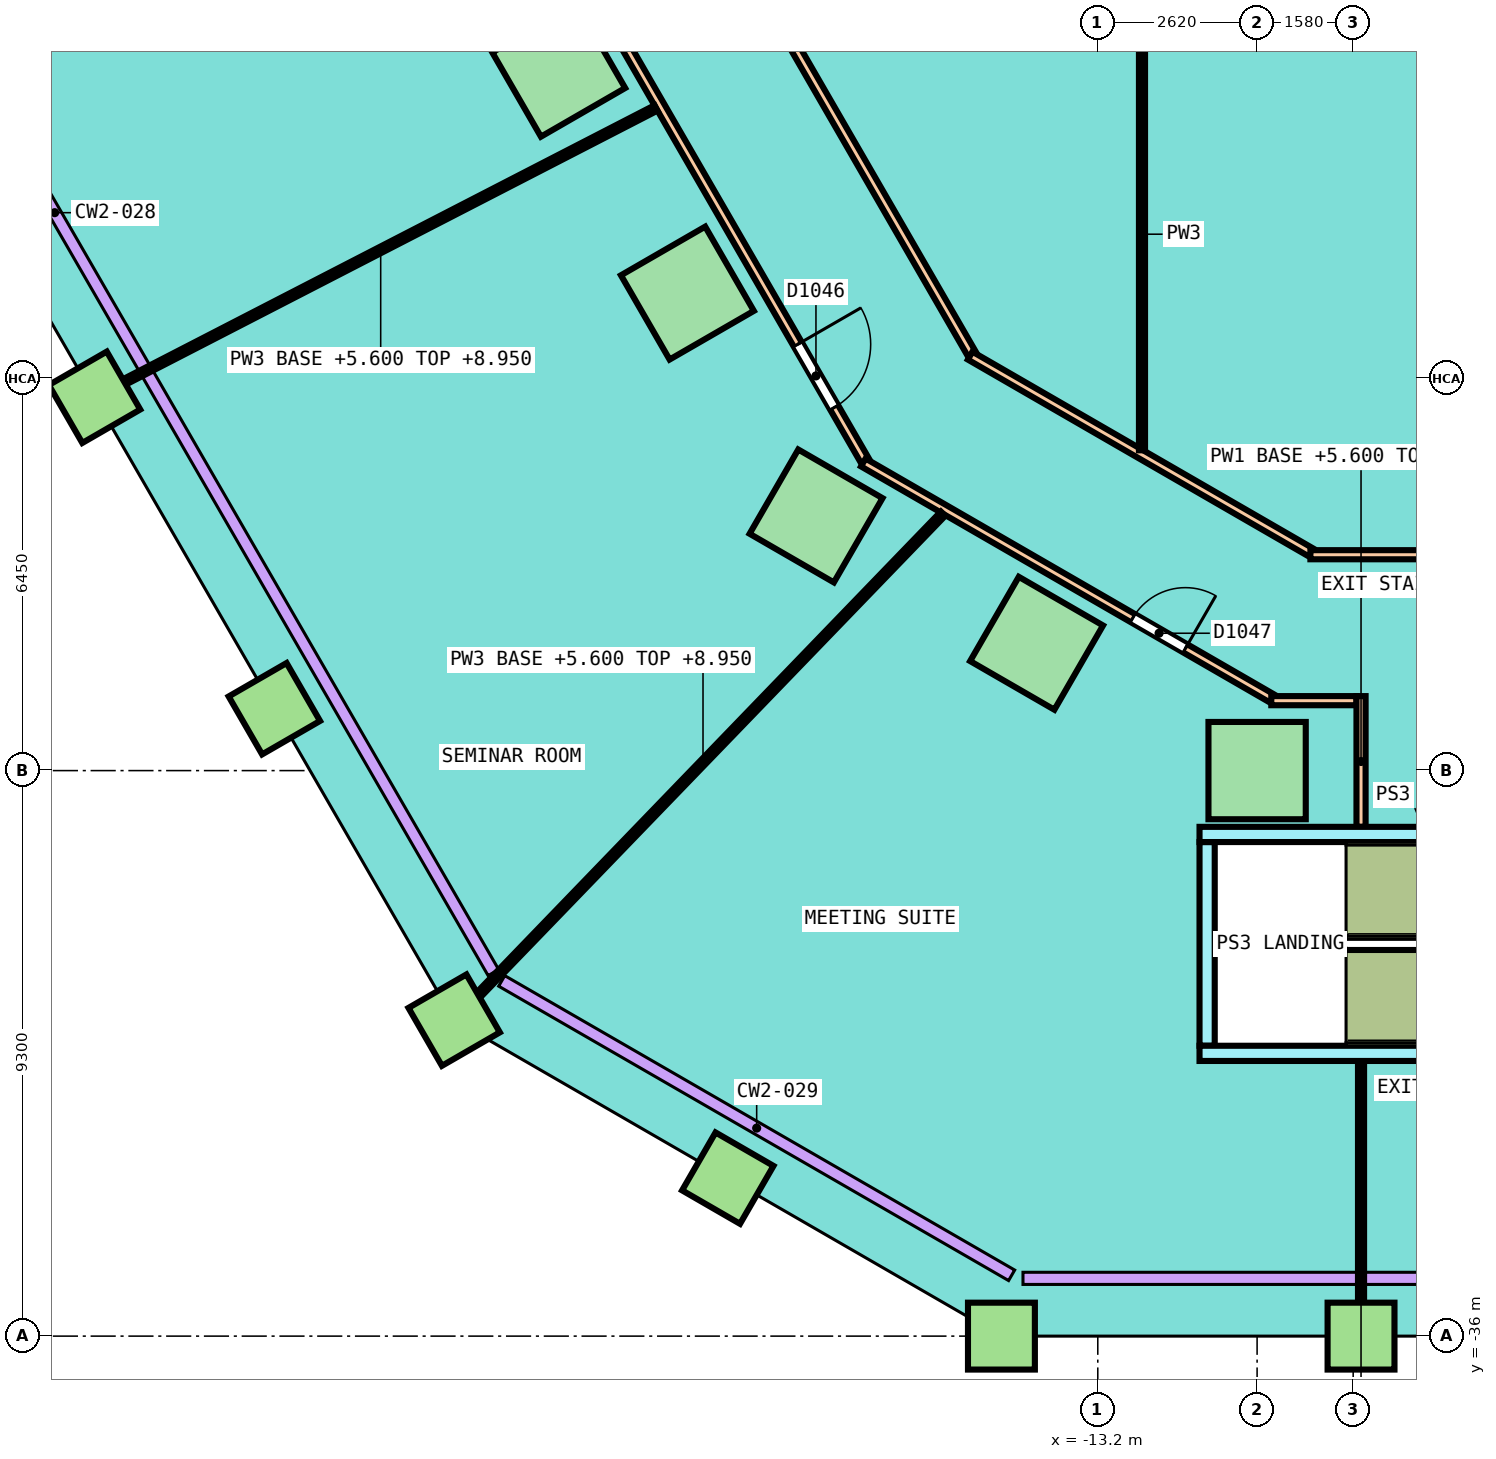
"""IFC4 building model, lengths in metres.
Left out: names, types, materials, properties, quantities, classifications, styles, units other than length and angle.
Written with IfcOpenShell. Run it as: python <this file> out.ifc"""

import sys

from ifc_helpers import new_model, si_unit, direction, frame, frame_2d, origin, origin_2d, place, context, subcontext, project, spatial, rectangle, extrude, element, fill, save


model = new_model("IFC4")
c1 = context("Model", 3, precision=1e-05, world=origin(), true_north=direction((0.0, 1.0)))
c2 = subcontext(c1, "Body", "Model", "MODEL_VIEW")
j1 = project(units=[si_unit("LENGTHUNIT", "METRE"), si_unit("PLANEANGLEUNIT", "RADIAN")], contexts=[c1])
p1 = place(None, origin())
s1 = spatial("IfcSite", under=j1, at=p1, CompositionType="ELEMENT")
p2 = place(p1, origin())
s2 = spatial("IfcBuilding", under=s1, at=p2, CompositionType="ELEMENT")
p3 = place(p2, frame((0.0, 0.0, 5.6)))
s3 = spatial("IfcBuildingStorey", under=s2, at=p3, CompositionType="ELEMENT", Elevation=5.6)
for number, where, z_axis, x_axis in (
    (1, (-22.065, -15.183, 0.0), (0.0, 0.0, 1.0), (0.5, -0.866, 0.0)),
    (2, (-19.949, -18.847, 0.0), (0.0, 0.0, 1.0), (0.5, -0.866, 0.0)),
    (3, (-17.833, -22.512, 0.0), (0.0, 0.0, 1.0), (0.866, -0.5, 0.0)),
    (4, (-14.206, -24.606, 0.0), (0.0, 0.0, 1.0), (0.866, -0.5, 0.0)),
    (5, (-10.58, -26.7, 0.0), (0.0, 0.0, 1.0), (1.0, 0.0, 0.0)),
):
    element("IfcColumn", number, at=place(p3, frame(where, z_axis=z_axis, x_axis=x_axis)), inside=s3, PredefinedType="COLUMN", context=c2, shape_type="SweptSolid", body=[
        extrude(rectangle(XDim=1.6, YDim=1.6, at=origin_2d()), origin(), (0.0, 0.0, 1.0), 4.25),
    ])
for number, where, z_axis, x_axis in (
    (6, (-29.698, -20.561, 0.0), (0.0, 0.0, 1.0), (0.5, -0.866, 0.0)),
    (7, (-26.741, -25.682, 0.0), (0.0, 0.0, 1.0), (0.5, -0.866, 0.0)),
    (8, (-23.785, -30.804, 0.0), (0.0, 0.0, 1.0), (0.5, -0.866, 0.0)),
    (9, (-19.285, -33.402, 0.0), (0.0, 0.0, 1.0), (0.866, -0.5, 0.0)),
    (10, (-14.785, -36.0, 0.0), (0.0, 0.0, 1.0), (1.0, 0.0, 0.0)),
    (11, (-8.871, -36.0, 0.0), (0.0, 0.0, 1.0), (1.0, 0.0, 0.0)),
):
    element("IfcColumn", number, at=place(p3, frame(where, z_axis=z_axis, x_axis=x_axis)), inside=s3, PredefinedType="COLUMN", context=c2, shape_type="SweptSolid", body=[
        extrude(rectangle(XDim=1.1, YDim=1.1, at=origin_2d()), origin(), (0.0, 0.0, 1.0), 4.25),
    ])
p4 = place(p3, frame((-22.753, -6.89, 0.0), z_axis=(0.0, 0.0, 1.0), x_axis=(0.499997859304, -0.866026639712, 0.0)))
e12 = element("IfcWall", 12, at=p4, inside=s3, PredefinedType="PARTITIONING", context=c2, shape_type="SweptSolid", body=[
    extrude(rectangle(XDim=14.963, YDim=0.15, at=frame_2d((7.482, 0.0))), origin(), (0.0, 0.0, 1.0), 3.2),
])
p5 = place(p4, frame((3.903, 0.0, 0.0)))
e13 = element("IfcOpeningElement", 13, at=p5, cuts=e12, PredefinedType="OPENING", context=c2, shape_type="SweptSolid", body=[
    extrude(rectangle(XDim=1.2, YDim=2.1, at=frame_2d((0.6, 1.05))), frame((0.0, 0.085, 0.0), z_axis=(0.0, -1.0, 0.0), x_axis=(1.0, 0.0, 0.0)), (0.0, 0.0, 1.0), 0.17),
])
p6 = place(p3, frame((-27.3, -3.814, 0.0), z_axis=(0.0, 0.0, 1.0), x_axis=(0.499997805905, -0.866026670542, 0.0)))
e14 = element("IfcWall", 14, at=p6, inside=s3, PredefinedType="PARTITIONING", context=c2, shape_type="SweptSolid", body=[
    extrude(rectangle(XDim=20.543, YDim=0.15, at=frame_2d((10.272, 0.0))), origin(), (0.0, 0.0, 1.0), 3.2),
])
p7 = place(p6, frame((9.647, 0.0, 0.0)))
e15 = element("IfcOpeningElement", 15, at=p7, cuts=e14, PredefinedType="OPENING", context=c2, shape_type="SweptSolid", body=[
    extrude(rectangle(XDim=1.2, YDim=2.1, at=frame_2d((0.6, 1.05))), frame((0.0, 0.085, 0.0), z_axis=(0.0, -1.0, 0.0), x_axis=(1.0, 0.0, 0.0)), (0.0, 0.0, 1.0), 0.17),
])
p8 = place(p6, frame((18.331, 0.0, 0.0)))
e16 = element("IfcOpeningElement", 16, at=p8, cuts=e14, PredefinedType="OPENING", context=c2, shape_type="SweptSolid", body=[
    extrude(rectangle(XDim=1.2, YDim=2.1, at=frame_2d((0.6, 1.05))), frame((0.0, 0.085, 0.0), z_axis=(0.0, -1.0, 0.0), x_axis=(1.0, 0.0, 0.0)), (0.0, 0.0, 1.0), 0.17),
])
p9 = place(p3, frame((-15.299, -19.876, 0.0), z_axis=(0.0, 0.0, 1.0), x_axis=(0.866024786089, -0.500001069878, 0.0)))
e17 = element("IfcWall", 17, at=p9, inside=s3, PredefinedType="PARTITIONING", context=c2, shape_type="SweptSolid", body=[
    extrude(rectangle(XDim=6.473, YDim=0.15, at=frame_2d((3.236, 0.0))), origin(), (0.0, 0.0, 1.0), 3.2),
])
p10 = place(p3, frame((-17.056, -21.633, 0.0), z_axis=(0.0, 0.0, 1.0), x_axis=(0.866023143435, -0.50000391502, 0.0)))
e18 = element("IfcWall", 18, at=p10, inside=s3, PredefinedType="PARTITIONING", context=c2, shape_type="SweptSolid", body=[
    extrude(rectangle(XDim=7.759, YDim=0.15, at=frame_2d((3.879, 0.0))), origin(), (0.0, 0.0, 1.0), 3.2),
])
p11 = place(p10, frame((5.116, 0.0, 0.0)))
e19 = element("IfcOpeningElement", 19, at=p11, cuts=e18, PredefinedType="OPENING", context=c2, shape_type="SweptSolid", body=[
    extrude(rectangle(XDim=1.0, YDim=2.1, at=frame_2d((0.5, 1.05))), frame((0.0, 0.085, 0.0), z_axis=(0.0, -1.0, 0.0), x_axis=(1.0, 0.0, 0.0)), (0.0, 0.0, 1.0), 0.17),
])
p12 = place(p3, frame((-10.347, -25.55, 0.0), z_axis=(0.0, 0.0, 1.0), x_axis=(1.0, 0.0, 0.0)))
e20 = element("IfcWall", 20, at=p12, inside=s3, PredefinedType="PARTITIONING", context=c2, shape_type="SweptSolid", body=[
    extrude(rectangle(XDim=1.401, YDim=0.15, at=frame_2d((0.7, 0.0))), origin(), (0.0, 0.0, 1.0), 3.2),
])
p13 = place(p3, frame((-8.871, -27.625, 0.0), z_axis=(0.0, 0.0, 1.0), x_axis=(0.0, 1.0, 0.0)))
e21 = element("IfcWall", 21, at=p13, inside=s3, PredefinedType="PARTITIONING", context=c2, shape_type="SweptSolid", body=[
    extrude(rectangle(XDim=2.15, YDim=0.15, at=frame_2d((1.075, 0.0))), origin(), (0.0, 0.0, 1.0), 3.35),
])
p14 = place(p3, frame((-9.704, -23.15, 0.0), z_axis=(0.0, 0.0, 1.0), x_axis=(1.0, 0.0, 0.0)))
e22 = element("IfcWall", 22, at=p14, inside=s3, PredefinedType="PARTITIONING", context=c2, shape_type="SweptSolid", body=[
    extrude(rectangle(XDim=16.429, YDim=0.15, at=frame_2d((8.214, 0.0))), origin(), (0.0, 0.0, 1.0), 3.2),
])
p15 = place(p3, frame((-29.521, -20.469, 0.0), z_axis=(0.0, 0.0, 1.0), x_axis=(0.888930498325, 0.458042104122, 0.0)))
e23 = element("IfcWall", 23, at=p15, inside=s3, PredefinedType="PARTITIONING", context=c2, shape_type="SweptSolid", body=[
    extrude(rectangle(XDim=10.187, YDim=0.1, at=frame_2d((5.093, 0.0))), origin(), (0.0, 0.0, 1.0), 3.35),
])
p16 = place(p3, frame((-12.473, -21.433, 0.0), z_axis=(0.0, 0.0, 1.0), x_axis=(0.0, 1.0, 0.0)))
e24 = element("IfcWall", 24, at=p16, inside=s3, PredefinedType="PARTITIONING", context=c2, shape_type="SweptSolid", body=[
    extrude(rectangle(XDim=7.108, YDim=0.1, at=frame_2d((3.554, 0.0))), origin(), (0.0, 0.0, 1.0), 3.2),
])
p17 = place(p3, frame((-23.64, -30.654, 0.0), z_axis=(0.0, 0.0, 1.0), x_axis=(0.694530893364, 0.719462881713, 0.0)))
e25 = element("IfcWall", 25, at=p17, inside=s3, PredefinedType="PARTITIONING", context=c2, shape_type="SweptSolid", body=[
    extrude(rectangle(XDim=11.369, YDim=0.1, at=frame_2d((5.685, 0.0))), origin(), (0.0, 0.0, 1.0), 3.35),
])
p18 = place(p3, frame((-8.871, -35.8, 0.0), z_axis=(0.0, 0.0, 1.0), x_axis=(0.0, 1.0, 0.0)))
e26 = element("IfcWall", 26, at=p18, inside=s3, PredefinedType="PARTITIONING", context=c2, shape_type="SweptSolid", body=[
    extrude(rectangle(XDim=4.325, YDim=0.1, at=frame_2d((2.163, 0.0))), origin(), (0.0, 0.0, 1.0), 4.25),
])
p19 = place(p3, frame((-11.402, -31.225, 0.0), z_axis=(0.0, 0.0, 1.0), x_axis=(0.0, 1.0, 0.0)))
e27 = element("IfcWall", 27, at=p19, inside=s3, PredefinedType="SOLIDWALL", context=c2, shape_type="SweptSolid", body=[
    extrude(rectangle(XDim=3.35, YDim=0.25, at=frame_2d((1.675, 0.0))), origin(), (0.0, 0.0, 1.0), 4.25),
])
p20 = place(p3, frame((-11.527, -27.75, 0.0), z_axis=(0.0, 0.0, 1.0), x_axis=(1.0, 0.0, 0.0)))
e28 = element("IfcWall", 28, at=p20, inside=s3, PredefinedType="SOLIDWALL", context=c2, shape_type="SweptSolid", body=[
    extrude(rectangle(XDim=8.495, YDim=0.25, at=frame_2d((4.248, 0.0))), origin(), (0.0, 0.0, 1.0), 4.25),
])
p21 = place(p20, frame((7.895, 0.0, 0.0), z_axis=(0.0, 0.0, 1.0), x_axis=(-1.0, 0.0, 0.0)))
e29 = element("IfcOpeningElement", 29, at=p21, cuts=e28, PredefinedType="OPENING", context=c2, shape_type="SweptSolid", body=[
    extrude(rectangle(XDim=1.2, YDim=2.1, at=frame_2d((0.6, 1.05))), frame((0.0, 0.135, 0.0), z_axis=(0.0, -1.0, 0.0), x_axis=(1.0, 0.0, 0.0)), (0.0, 0.0, 1.0), 0.27),
])
p22 = place(p3, frame((-11.527, -31.35, 0.0), z_axis=(0.0, 0.0, 1.0), x_axis=(1.0, 0.0, 0.0)))
e30 = element("IfcWall", 30, at=p22, inside=s3, PredefinedType="SOLIDWALL", context=c2, shape_type="SweptSolid", body=[
    extrude(rectangle(XDim=8.52, YDim=0.25, at=frame_2d((4.26, 0.0))), origin(), (0.0, 0.0, 1.0), 4.25),
])
p23 = place(p3, frame((-24.277, -29.951, 0.0), z_axis=(0.0, 0.0, 1.0), x_axis=(-0.866031096941, -0.499990139034, 0.0)))
e31 = element("IfcWall", 31, at=p23, inside=s3, PredefinedType="SOLIDWALL", context=c2, shape_type="SweptSolid", body=[
    extrude(rectangle(XDim=3.0, YDim=0.4, at=frame_2d((1.5, 0.0))), origin(), (0.0, 0.0, 1.0), 4.6),
])
for number, where, z_axis, x_axis in (
    (32, (-31.15, -18.446, 0.0), (0.0, 0.0, 1.0), (0.5, -0.866, 0.0)),
    (33, (-33.402, -19.746, 0.0), (0.0, 0.0, 1.0), (0.5, -0.866, 0.0)),
):
    element("IfcWall", number, at=place(p3, frame(where, z_axis=z_axis, x_axis=x_axis)), inside=s3, PredefinedType="SOLIDWALL", context=c2, shape_type="SweptSolid", body=[
        extrude(rectangle(XDim=13.2, YDim=0.4, at=frame_2d((6.6, 0.0))), origin(), (0.0, 0.0, 1.0), 4.6),
    ])
p24 = place(p3, frame((-30.252, -33.401, 0.0), z_axis=(0.0, 0.0, 1.0), x_axis=(-0.866022959057, -0.500004234368, 0.0)))
e34 = element("IfcWall", 34, at=p24, inside=s3, PredefinedType="SOLIDWALL", context=c2, shape_type="SweptSolid", body=[
    extrude(rectangle(XDim=2.5, YDim=0.4, at=frame_2d((1.25, 0.0))), origin(), (0.0, 0.0, 1.0), 4.6),
])
p25 = place(p3, frame((-37.126, -21.896, 0.0), z_axis=(0.0, 0.0, 1.0), x_axis=(0.500010103361, -0.866019570528, 0.0)))
e35 = element("IfcWall", 35, at=p25, inside=s3, PredefinedType="SOLIDWALL", context=c2, shape_type="SweptSolid", body=[
    extrude(rectangle(XDim=13.2, YDim=0.4, at=frame_2d((6.6, 0.0))), origin(), (0.0, 0.0, 1.0), 4.6),
])
p26 = place(p3, frame((-24.077, -30.298, 0.0), z_axis=(0.0, 0.0, 1.0), x_axis=(-0.866031096941, -0.499990139034, 0.0)))
e36 = element("IfcWall", 36, at=p26, inside=s3, PredefinedType="SOLIDWALL", context=c2, shape_type="SweptSolid", body=[
    extrude(rectangle(XDim=3.0, YDim=0.4, at=frame_2d((1.5, 0.0))), origin(), (0.0, 0.0, 1.0), 4.6),
])
for number, where, z_axis, x_axis in (
    (37, (-26.675, -31.798, 0.0), (0.0, 0.0, 1.0), (-0.866, -0.5, 0.0)),
    (38, (-28.364, -32.773, 0.0), (0.0, 0.0, 1.0), (-0.866, -0.5, 0.0)),
):
    element("IfcWall", number, at=place(p3, frame(where, z_axis=z_axis, x_axis=x_axis)), inside=s3, PredefinedType="SOLIDWALL", context=c2, shape_type="SweptSolid", body=[
        extrude(rectangle(XDim=1.95, YDim=0.4, at=frame_2d((0.975, 0.0))), origin(), (0.0, 0.0, 1.0), 4.6),
    ])
p27 = place(p3, frame((-30.052, -33.748, 0.0), z_axis=(0.0, 0.0, 1.0), x_axis=(-0.866022959057, -0.500004234368, 0.0)))
e39 = element("IfcWall", 39, at=p27, inside=s3, PredefinedType="SOLIDWALL", context=c2, shape_type="SweptSolid", body=[
    extrude(rectangle(XDim=2.5, YDim=0.4, at=frame_2d((1.25, 0.0))), origin(), (0.0, 0.0, 1.0), 4.6),
])
p28 = place(p8, origin())
e40 = element("IfcDoor", 40, at=p28, inside=s3, OperationType="DOUBLE_DOOR_SINGLE_SWING", PredefinedType="DOOR", context=c2, shape_type="SweptSolid", body=[
    extrude(rectangle(XDim=1.2, YDim=2.1, at=frame_2d((0.6, 1.05))), frame((0.0, 0.025, 0.0), z_axis=(0.0, -1.0, 0.0), x_axis=(1.0, 0.0, 0.0)), (0.0, 0.0, 1.0), 0.05),
])
fill(e16, e40)
p29 = place(p11, origin())
e41 = element("IfcDoor", 41, at=p29, inside=s3, OperationType="SINGLE_SWING_RIGHT", PredefinedType="DOOR", context=c2, shape_type="SweptSolid", body=[
    extrude(rectangle(XDim=1.0, YDim=2.1, at=frame_2d((0.5, 1.05))), frame((0.0, 0.025, 0.0), z_axis=(0.0, -1.0, 0.0), x_axis=(1.0, 0.0, 0.0)), (0.0, 0.0, 1.0), 0.05),
])
fill(e19, e41)
save(model, sys.argv[1])
